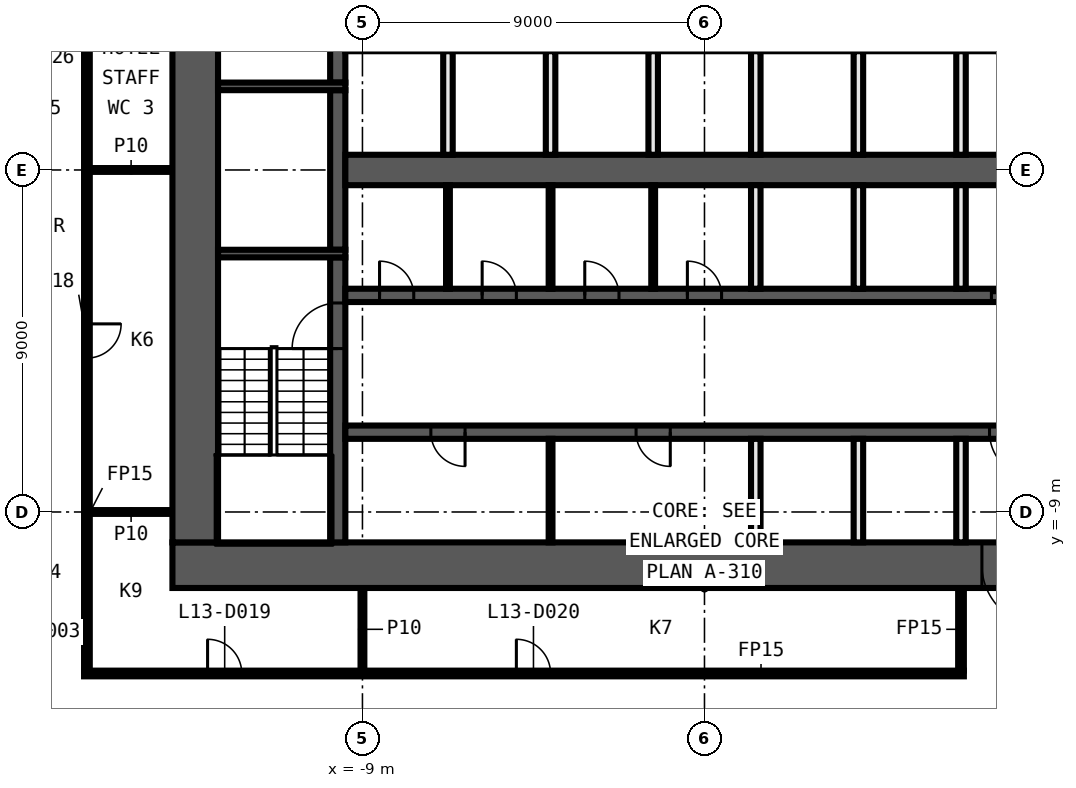
"""IFC4 building model, lengths in metres.
Left out: names, types, materials, properties, quantities, classifications, styles, units other than length and angle.
Written with IfcOpenShell. Run it as: python <this file> out.ifc"""

import sys

from ifc_helpers import new_model, si_unit, direction, frame, frame_2d, origin, place, context, subcontext, project, spatial, rectangle, extrude, element, fill, save


model = new_model("IFC4")
c1 = context("Model", 3, precision=1e-05, world=origin(), true_north=direction((0.0, 1.0)))
c2 = subcontext(c1, "Body", "Model", "MODEL_VIEW")
j1 = project(units=[si_unit("LENGTHUNIT", "METRE"), si_unit("PLANEANGLEUNIT", "RADIAN")], contexts=[c1])
p1 = place(None, origin())
s1 = spatial("IfcSite", under=j1, at=p1, CompositionType="ELEMENT")
p2 = place(p1, origin())
s2 = spatial("IfcBuilding", under=s1, at=p2, CompositionType="ELEMENT")
p3 = place(p2, frame((0.0, 0.0, 69.9)))
s3 = spatial("IfcBuildingStorey", under=s2, at=p3, CompositionType="ELEMENT", Elevation=69.9)
p4 = place(p3, frame((-16.325, -13.25, 0.0), z_axis=(0.0, 0.0, 1.0), x_axis=(1.0, 0.0, 0.0)))
e1 = element("IfcWall", 1, at=p4, inside=s3, PredefinedType="PARTITIONING", context=c2, shape_type="SweptSolid", body=[
    extrude(rectangle(XDim=23.15, YDim=0.15, at=frame_2d((11.575, 0.0))), origin(), (0.0, 0.0, 1.0), 3.3),
])
p5 = place(p4, frame((3.25, 0.0, 0.0)))
e2 = element("IfcOpeningElement", 2, at=p5, cuts=e1, PredefinedType="OPENING", context=c2, shape_type="SweptSolid", body=[
    extrude(rectangle(XDim=0.9, YDim=2.1, at=frame_2d((0.45, 1.05))), frame((0.0, 0.085, 0.0), z_axis=(0.0, -1.0, 0.0), x_axis=(1.0, 0.0, 0.0)), (0.0, 0.0, 1.0), 0.17),
])
p6 = place(p4, frame((11.375, 0.0, 0.0)))
e3 = element("IfcOpeningElement", 3, at=p6, cuts=e1, PredefinedType="OPENING", context=c2, shape_type="SweptSolid", body=[
    extrude(rectangle(XDim=0.9, YDim=2.1, at=frame_2d((0.45, 1.05))), frame((0.0, 0.085, 0.0), z_axis=(0.0, -1.0, 0.0), x_axis=(1.0, 0.0, 0.0)), (0.0, 0.0, 1.0), 0.17),
])
for number, where, z_axis, x_axis in (
    (4, (-16.175, -9.0, 0.0), (0.0, 0.0, 1.0), (1.0, 0.0, 0.0)),
    (5, (-16.175, 0.0, 0.0), (0.0, 0.0, 1.0), (1.0, 0.0, 0.0)),
):
    element("IfcWall", number, at=place(p3, frame(where, z_axis=z_axis, x_axis=x_axis)), inside=s3, PredefinedType="PARTITIONING", context=c2, shape_type="SweptSolid", body=[
        extrude(rectangle(XDim=2.175, YDim=0.1, at=frame_2d((1.087, 0.0))), origin(), (0.0, 0.0, 1.0), 3.3),
    ])
p7 = place(p3, frame((6.75, -13.175, 0.0), z_axis=(0.0, 0.0, 1.0), x_axis=(0.0, 1.0, 0.0)))
e6 = element("IfcWall", 6, at=p7, inside=s3, PredefinedType="PARTITIONING", context=c2, shape_type="SweptSolid", body=[
    extrude(rectangle(XDim=2.175, YDim=0.15, at=frame_2d((1.087, 0.0))), origin(), (0.0, 0.0, 1.0), 3.3),
])
p8 = place(p3, frame((-9.0, -13.175, 0.0), z_axis=(0.0, 0.0, 1.0), x_axis=(0.0, 1.0, 0.0)))
e7 = element("IfcWall", 7, at=p8, inside=s3, PredefinedType="PARTITIONING", context=c2, shape_type="SweptSolid", body=[
    extrude(rectangle(XDim=2.175, YDim=0.1, at=frame_2d((1.087, 0.0))), origin(), (0.0, 0.0, 1.0), 3.3),
])
p9 = place(p3, frame((-16.25, 13.175, 0.0), z_axis=(0.0, 0.0, 1.0), x_axis=(0.0, -1.0, 0.0)))
e8 = element("IfcWall", 8, at=p9, inside=s3, PredefinedType="PARTITIONING", context=c2, shape_type="SweptSolid", body=[
    extrude(rectangle(XDim=26.35, YDim=0.15, at=frame_2d((13.175, 0.0))), origin(), (0.0, 0.0, 1.0), 3.3),
])
p10 = place(p9, frame((17.225, 0.0, 0.0)))
e9 = element("IfcOpeningElement", 9, at=p10, cuts=e8, PredefinedType="OPENING", context=c2, shape_type="SweptSolid", body=[
    extrude(rectangle(XDim=0.9, YDim=2.1, at=frame_2d((0.45, 1.05))), frame((0.0, 0.085, 0.0), z_axis=(0.0, -1.0, 0.0), x_axis=(1.0, 0.0, 0.0)), (0.0, 0.0, 1.0), 0.17),
])
p11 = place(p9, frame((8.225, 0.0, 0.0)))
e10 = element("IfcOpeningElement", 10, at=p11, cuts=e8, PredefinedType="OPENING", context=c2, shape_type="SweptSolid", body=[
    extrude(rectangle(XDim=0.9, YDim=2.1, at=frame_2d((0.45, 1.05))), frame((0.0, 0.085, 0.0), z_axis=(0.0, -1.0, 0.0), x_axis=(1.0, 0.0, 0.0)), (0.0, 0.0, 1.0), 0.17),
])
p12 = place(p3, frame((14.0, -10.4, 0.0), z_axis=(0.0, 0.0, 1.0), x_axis=(-1.0, 0.0, 0.0)))
e11 = element("IfcWall", 11, at=p12, inside=s3, PredefinedType="SHEAR", context=c2, shape_type="SweptSolid", body=[
    extrude(rectangle(XDim=28.0, YDim=1.2, at=frame_2d((14.0, 0.0))), origin(), (0.0, 0.0, 1.0), 3.3),
])
p13 = place(p12, frame((5.1, 0.0, 0.0)))
e12 = element("IfcOpeningElement", 12, at=p13, cuts=e11, PredefinedType="OPENING", context=c2, shape_type="SweptSolid", body=[
    extrude(rectangle(XDim=1.6, YDim=2.1, at=frame_2d((0.8, 1.05))), frame((0.0, 0.61, 0.0), z_axis=(0.0, -1.0, 0.0), x_axis=(1.0, 0.0, 0.0)), (0.0, 0.0, 1.0), 1.22),
])
p14 = place(p3, frame((-13.4, -9.8, 0.0), z_axis=(0.0, 0.0, 1.0), x_axis=(0.0, 1.0, 0.0)))
e13 = element("IfcWall", 13, at=p14, inside=s3, PredefinedType="SHEAR", context=c2, shape_type="SweptSolid", body=[
    extrude(rectangle(XDim=19.6, YDim=1.2, at=frame_2d((9.8, 0.0))), origin(), (0.0, 0.0, 1.0), 3.3),
])
p15 = place(p3, frame((-9.65, -9.8, 0.0), z_axis=(0.0, 0.0, 1.0), x_axis=(0.0, 1.0, 0.0)))
e14 = element("IfcWall", 14, at=p15, inside=s3, PredefinedType="SHEAR", context=c2, shape_type="SweptSolid", body=[
    extrude(rectangle(XDim=7.5, YDim=0.4, at=frame_2d((3.75, 0.0))), origin(), (0.0, 0.0, 1.0), 3.3),
])
p16 = place(p15, frame((5.1, 0.0, 0.0)))
e15 = element("IfcOpeningElement", 15, at=p16, cuts=e14, PredefinedType="OPENING", context=c2, shape_type="SweptSolid", body=[
    extrude(rectangle(XDim=1.2, YDim=2.1, at=frame_2d((0.6, 1.05))), frame((0.0, 0.21, 0.0), z_axis=(0.0, -1.0, 0.0), x_axis=(1.0, 0.0, 0.0)), (0.0, 0.0, 1.0), 0.42),
])
p17 = place(p3, frame((-9.65, -2.1, 0.0), z_axis=(0.0, 0.0, 1.0), x_axis=(0.0, 1.0, 0.0)))
e16 = element("IfcWall", 16, at=p17, inside=s3, PredefinedType="SHEAR", context=c2, shape_type="SweptSolid", body=[
    extrude(rectangle(XDim=4.2, YDim=0.4, at=frame_2d((2.1, 0.0))), origin(), (0.0, 0.0, 1.0), 3.3),
])
p18 = place(p3, frame((-9.65, 2.3, 0.0), z_axis=(0.0, 0.0, 1.0), x_axis=(0.0, 1.0, 0.0)))
e17 = element("IfcWall", 17, at=p18, inside=s3, PredefinedType="SHEAR", context=c2, shape_type="SweptSolid", body=[
    extrude(rectangle(XDim=7.5, YDim=0.4, at=frame_2d((3.75, 0.0))), origin(), (0.0, 0.0, 1.0), 3.3),
])
p19 = place(p18, frame((1.2, 0.0, 0.0)))
e18 = element("IfcOpeningElement", 18, at=p19, cuts=e17, PredefinedType="OPENING", context=c2, shape_type="SweptSolid", body=[
    extrude(rectangle(XDim=1.2, YDim=2.1, at=frame_2d((0.6, 1.05))), frame((0.0, 0.21, 0.0), z_axis=(0.0, -1.0, 0.0), x_axis=(1.0, 0.0, 0.0)), (0.0, 0.0, 1.0), 0.42),
])
for number, where, z_axis, x_axis in (
    (19, (-9.45, 2.2, 0.0), (0.0, 0.0, 1.0), (-1.0, 0.0, 0.0)),
    (20, (-9.45, -2.2, 0.0), (0.0, 0.0, 1.0), (-1.0, 0.0, 0.0)),
):
    element("IfcWall", number, at=place(p3, frame(where, z_axis=z_axis, x_axis=x_axis)), inside=s3, PredefinedType="SHEAR", context=c2, shape_type="SweptSolid", body=[
        extrude(rectangle(XDim=3.35, YDim=0.2, at=frame_2d((1.675, 0.0))), origin(), (0.0, 0.0, 1.0), 3.3),
    ])
p20 = place(p3, frame((-9.45, -3.3, 0.0), z_axis=(0.0, 0.0, 1.0), x_axis=(1.0, 0.0, 0.0)))
e21 = element("IfcWall", 21, at=p20, inside=s3, PredefinedType="SHEAR", context=c2, shape_type="SweptSolid", body=[
    extrude(rectangle(XDim=18.9, YDim=0.35, at=frame_2d((9.45, 0.0))), origin(), (0.0, 0.0, 1.0), 3.3),
])
p21 = place(p20, frame((17.0, 0.0, 0.0)))
e22 = element("IfcOpeningElement", 22, at=p21, cuts=e21, PredefinedType="OPENING", context=c2, shape_type="SweptSolid", body=[
    extrude(rectangle(XDim=1.1, YDim=2.1, at=frame_2d((0.55, 1.05))), frame((0.0, 0.185, 0.0), z_axis=(0.0, -1.0, 0.0), x_axis=(1.0, 0.0, 0.0)), (0.0, 0.0, 1.0), 0.37),
])
p22 = place(p20, frame((0.9, 0.0, 0.0)))
e23 = element("IfcOpeningElement", 23, at=p22, cuts=e21, PredefinedType="OPENING", context=c2, shape_type="SweptSolid", body=[
    extrude(rectangle(XDim=0.9, YDim=2.1, at=frame_2d((0.45, 1.05))), frame((0.0, 0.185, 0.0), z_axis=(0.0, -1.0, 0.0), x_axis=(1.0, 0.0, 0.0)), (0.0, 0.0, 1.0), 0.37),
])
p23 = place(p20, frame((3.6, 0.0, 0.0)))
e24 = element("IfcOpeningElement", 24, at=p23, cuts=e21, PredefinedType="OPENING", context=c2, shape_type="SweptSolid", body=[
    extrude(rectangle(XDim=0.9, YDim=2.1, at=frame_2d((0.45, 1.05))), frame((0.0, 0.185, 0.0), z_axis=(0.0, -1.0, 0.0), x_axis=(1.0, 0.0, 0.0)), (0.0, 0.0, 1.0), 0.37),
])
p24 = place(p20, frame((6.3, 0.0, 0.0)))
e25 = element("IfcOpeningElement", 25, at=p24, cuts=e21, PredefinedType="OPENING", context=c2, shape_type="SweptSolid", body=[
    extrude(rectangle(XDim=0.9, YDim=2.1, at=frame_2d((0.45, 1.05))), frame((0.0, 0.185, 0.0), z_axis=(0.0, -1.0, 0.0), x_axis=(1.0, 0.0, 0.0)), (0.0, 0.0, 1.0), 0.37),
])
p25 = place(p20, frame((9.0, 0.0, 0.0)))
e26 = element("IfcOpeningElement", 26, at=p25, cuts=e21, PredefinedType="OPENING", context=c2, shape_type="SweptSolid", body=[
    extrude(rectangle(XDim=0.9, YDim=2.1, at=frame_2d((0.45, 1.05))), frame((0.0, 0.185, 0.0), z_axis=(0.0, -1.0, 0.0), x_axis=(1.0, 0.0, 0.0)), (0.0, 0.0, 1.0), 0.37),
])
p26 = place(p3, frame((9.45, -6.9, 0.0), z_axis=(0.0, 0.0, 1.0), x_axis=(-1.0, 0.0, 0.0)))
e27 = element("IfcWall", 27, at=p26, inside=s3, PredefinedType="SHEAR", context=c2, shape_type="SweptSolid", body=[
    extrude(rectangle(XDim=18.9, YDim=0.35, at=frame_2d((9.45, 0.0))), origin(), (0.0, 0.0, 1.0), 3.3),
])
p27 = place(p26, frame((0.75, 0.0, 0.0)))
e28 = element("IfcOpeningElement", 28, at=p27, cuts=e27, PredefinedType="OPENING", context=c2, shape_type="SweptSolid", body=[
    extrude(rectangle(XDim=1.2, YDim=2.1, at=frame_2d((0.6, 1.05))), frame((0.0, 0.185, 0.0), z_axis=(0.0, -1.0, 0.0), x_axis=(1.0, 0.0, 0.0)), (0.0, 0.0, 1.0), 0.37),
])
p28 = place(p26, frame((15.75, 0.0, 0.0)))
e29 = element("IfcOpeningElement", 29, at=p28, cuts=e27, PredefinedType="OPENING", context=c2, shape_type="SweptSolid", body=[
    extrude(rectangle(XDim=0.9, YDim=2.1, at=frame_2d((0.45, 1.05))), frame((0.0, 0.185, 0.0), z_axis=(0.0, -1.0, 0.0), x_axis=(1.0, 0.0, 0.0)), (0.0, 0.0, 1.0), 0.37),
])
p29 = place(p26, frame((10.35, 0.0, 0.0)))
e30 = element("IfcOpeningElement", 30, at=p29, cuts=e27, PredefinedType="OPENING", context=c2, shape_type="SweptSolid", body=[
    extrude(rectangle(XDim=0.9, YDim=2.1, at=frame_2d((0.45, 1.05))), frame((0.0, 0.185, 0.0), z_axis=(0.0, -1.0, 0.0), x_axis=(1.0, 0.0, 0.0)), (0.0, 0.0, 1.0), 0.37),
])
p30 = place(p3, frame((-9.45, 0.0, 0.0), z_axis=(0.0, 0.0, 1.0), x_axis=(1.0, 0.0, 0.0)))
e31 = element("IfcWall", 31, at=p30, inside=s3, PredefinedType="SHEAR", context=c2, shape_type="SweptSolid", body=[
    extrude(rectangle(XDim=18.9, YDim=0.8, at=frame_2d((9.45, 0.0))), origin(), (0.0, 0.0, 1.0), 3.3),
])
for number, where, z_axis, x_axis in (
    (32, (6.75, -9.8, 0.0), (0.0, 0.0, 1.0), (0.0, 1.0, 0.0)),
    (33, (6.75, -3.125, 0.0), (0.0, 0.0, 1.0), (0.0, 1.0, 0.0)),
    (34, (6.75, 0.4, 0.0), (0.0, 0.0, 1.0), (0.0, 1.0, 0.0)),
    (35, (4.05, -9.8, 0.0), (0.0, 0.0, 1.0), (0.0, 1.0, 0.0)),
    (36, (4.05, -3.125, 0.0), (0.0, 0.0, 1.0), (0.0, 1.0, 0.0)),
    (37, (4.05, 0.4, 0.0), (0.0, 0.0, 1.0), (0.0, 1.0, 0.0)),
    (38, (1.35, -9.8, 0.0), (0.0, 0.0, 1.0), (0.0, 1.0, 0.0)),
    (39, (1.35, -3.125, 0.0), (0.0, 0.0, 1.0), (0.0, 1.0, 0.0)),
    (40, (1.35, 0.4, 0.0), (0.0, 0.0, 1.0), (0.0, 1.0, 0.0)),
):
    element("IfcWall", number, at=place(p3, frame(where, z_axis=z_axis, x_axis=x_axis)), inside=s3, PredefinedType="SOLIDWALL", context=c2, shape_type="SweptSolid", body=[
        extrude(rectangle(XDim=2.725, YDim=0.25, at=frame_2d((1.363, 0.0))), origin(), (0.0, 0.0, 1.0), 3.3),
    ])
p31 = place(p3, frame((-1.35, -3.125, 0.0), z_axis=(0.0, 0.0, 1.0), x_axis=(0.0, 1.0, 0.0)))
e41 = element("IfcWall", 41, at=p31, inside=s3, PredefinedType="PARTITIONING", context=c2, shape_type="SweptSolid", body=[
    extrude(rectangle(XDim=2.725, YDim=0.1, at=frame_2d((1.363, 0.0))), origin(), (0.0, 0.0, 1.0), 3.3),
])
p32 = place(p3, frame((-1.35, 0.4, 0.0), z_axis=(0.0, 0.0, 1.0), x_axis=(0.0, 1.0, 0.0)))
e42 = element("IfcWall", 42, at=p32, inside=s3, PredefinedType="SOLIDWALL", context=c2, shape_type="SweptSolid", body=[
    extrude(rectangle(XDim=2.725, YDim=0.25, at=frame_2d((1.363, 0.0))), origin(), (0.0, 0.0, 1.0), 3.3),
])
for number, where, z_axis, x_axis in (
    (43, (-4.05, -9.8, 0.0), (0.0, 0.0, 1.0), (0.0, 1.0, 0.0)),
    (44, (-4.05, -3.125, 0.0), (0.0, 0.0, 1.0), (0.0, 1.0, 0.0)),
):
    element("IfcWall", number, at=place(p3, frame(where, z_axis=z_axis, x_axis=x_axis)), inside=s3, PredefinedType="PARTITIONING", context=c2, shape_type="SweptSolid", body=[
        extrude(rectangle(XDim=2.725, YDim=0.1, at=frame_2d((1.363, 0.0))), origin(), (0.0, 0.0, 1.0), 3.3),
    ])
p33 = place(p3, frame((-4.05, 0.4, 0.0), z_axis=(0.0, 0.0, 1.0), x_axis=(0.0, 1.0, 0.0)))
e45 = element("IfcWall", 45, at=p33, inside=s3, PredefinedType="SOLIDWALL", context=c2, shape_type="SweptSolid", body=[
    extrude(rectangle(XDim=2.725, YDim=0.25, at=frame_2d((1.363, 0.0))), origin(), (0.0, 0.0, 1.0), 3.3),
])
p34 = place(p3, frame((-6.75, -3.125, 0.0), z_axis=(0.0, 0.0, 1.0), x_axis=(0.0, 1.0, 0.0)))
e46 = element("IfcWall", 46, at=p34, inside=s3, PredefinedType="PARTITIONING", context=c2, shape_type="SweptSolid", body=[
    extrude(rectangle(XDim=2.725, YDim=0.1, at=frame_2d((1.363, 0.0))), origin(), (0.0, 0.0, 1.0), 3.3),
])
p35 = place(p3, frame((-6.75, 0.4, 0.0), z_axis=(0.0, 0.0, 1.0), x_axis=(0.0, 1.0, 0.0)))
e47 = element("IfcWall", 47, at=p35, inside=s3, PredefinedType="SOLIDWALL", context=c2, shape_type="SweptSolid", body=[
    extrude(rectangle(XDim=2.725, YDim=0.25, at=frame_2d((1.363, 0.0))), origin(), (0.0, 0.0, 1.0), 3.3),
])
p36 = place(p10, origin())
e48 = element("IfcDoor", 48, at=p36, inside=s3, OperationType="SINGLE_SWING_RIGHT", PredefinedType="DOOR", context=c2, shape_type="SweptSolid", body=[
    extrude(rectangle(XDim=0.9, YDim=2.1, at=frame_2d((0.45, 1.05))), frame((0.0, 0.025, 0.0), z_axis=(0.0, -1.0, 0.0), x_axis=(1.0, 0.0, 0.0)), (0.0, 0.0, 1.0), 0.05),
])
fill(e9, e48)
p37 = place(p5, origin())
e49 = element("IfcDoor", 49, at=p37, inside=s3, OperationType="SINGLE_SWING_LEFT", PredefinedType="DOOR", context=c2, shape_type="SweptSolid", body=[
    extrude(rectangle(XDim=0.9, YDim=2.1, at=frame_2d((0.45, 1.05))), frame((0.0, 0.025, 0.0), z_axis=(0.0, -1.0, 0.0), x_axis=(1.0, 0.0, 0.0)), (0.0, 0.0, 1.0), 0.05),
])
fill(e2, e49)
p38 = place(p6, origin())
e50 = element("IfcDoor", 50, at=p38, inside=s3, OperationType="SINGLE_SWING_RIGHT", PredefinedType="DOOR", context=c2, shape_type="SweptSolid", body=[
    extrude(rectangle(XDim=0.9, YDim=2.1, at=frame_2d((0.45, 1.05))), frame((0.0, 0.025, 0.0), z_axis=(0.0, -1.0, 0.0), x_axis=(1.0, 0.0, 0.0)), (0.0, 0.0, 1.0), 0.05),
])
fill(e3, e50)
p39 = place(p21, origin())
e51 = element("IfcDoor", 51, at=p39, inside=s3, OperationType="DOUBLE_DOOR_SLIDING", PredefinedType="DOOR", context=c2, shape_type="SweptSolid", body=[
    extrude(rectangle(XDim=1.1, YDim=2.1, at=frame_2d((0.55, 1.05))), frame((0.0, 0.025, 0.0), z_axis=(0.0, -1.0, 0.0), x_axis=(1.0, 0.0, 0.0)), (0.0, 0.0, 1.0), 0.05),
])
fill(e22, e51)
p40 = place(p13, origin())
e52 = element("IfcDoor", 52, at=p40, inside=s3, OperationType="DOUBLE_DOOR_SINGLE_SWING", PredefinedType="DOOR", context=c2, shape_type="SweptSolid", body=[
    extrude(rectangle(XDim=1.6, YDim=2.1, at=frame_2d((0.8, 1.05))), frame((0.0, 0.025, 0.0), z_axis=(0.0, -1.0, 0.0), x_axis=(1.0, 0.0, 0.0)), (0.0, 0.0, 1.0), 0.05),
])
fill(e12, e52)
p41 = place(p27, origin())
e53 = element("IfcDoor", 53, at=p41, inside=s3, OperationType="SINGLE_SWING_LEFT", PredefinedType="DOOR", context=c2, shape_type="SweptSolid", body=[
    extrude(rectangle(XDim=1.2, YDim=2.1, at=frame_2d((0.6, 1.05))), frame((0.0, 0.025, 0.0), z_axis=(0.0, -1.0, 0.0), x_axis=(1.0, 0.0, 0.0)), (0.0, 0.0, 1.0), 0.05),
])
fill(e28, e53)
p42 = place(p22, origin())
e54 = element("IfcDoor", 54, at=p42, inside=s3, OperationType="SINGLE_SWING_RIGHT", PredefinedType="DOOR", context=c2, shape_type="SweptSolid", body=[
    extrude(rectangle(XDim=0.9, YDim=2.1, at=frame_2d((0.45, 1.05))), frame((0.0, 0.025, 0.0), z_axis=(0.0, -1.0, 0.0), x_axis=(1.0, 0.0, 0.0)), (0.0, 0.0, 1.0), 0.05),
])
fill(e23, e54)
p43 = place(p23, origin())
e55 = element("IfcDoor", 55, at=p43, inside=s3, OperationType="SINGLE_SWING_LEFT", PredefinedType="DOOR", context=c2, shape_type="SweptSolid", body=[
    extrude(rectangle(XDim=0.9, YDim=2.1, at=frame_2d((0.45, 1.05))), frame((0.0, 0.025, 0.0), z_axis=(0.0, -1.0, 0.0), x_axis=(1.0, 0.0, 0.0)), (0.0, 0.0, 1.0), 0.05),
])
fill(e24, e55)
p44 = place(p24, origin())
e56 = element("IfcDoor", 56, at=p44, inside=s3, OperationType="SINGLE_SWING_RIGHT", PredefinedType="DOOR", context=c2, shape_type="SweptSolid", body=[
    extrude(rectangle(XDim=0.9, YDim=2.1, at=frame_2d((0.45, 1.05))), frame((0.0, 0.025, 0.0), z_axis=(0.0, -1.0, 0.0), x_axis=(1.0, 0.0, 0.0)), (0.0, 0.0, 1.0), 0.05),
])
fill(e25, e56)
p45 = place(p25, origin())
e57 = element("IfcDoor", 57, at=p45, inside=s3, OperationType="SINGLE_SWING_LEFT", PredefinedType="DOOR", context=c2, shape_type="SweptSolid", body=[
    extrude(rectangle(XDim=0.9, YDim=2.1, at=frame_2d((0.45, 1.05))), frame((0.0, 0.025, 0.0), z_axis=(0.0, -1.0, 0.0), x_axis=(1.0, 0.0, 0.0)), (0.0, 0.0, 1.0), 0.05),
])
fill(e26, e57)
p46 = place(p28, origin())
e58 = element("IfcDoor", 58, at=p46, inside=s3, OperationType="SINGLE_SWING_RIGHT", PredefinedType="DOOR", context=c2, shape_type="SweptSolid", body=[
    extrude(rectangle(XDim=0.9, YDim=2.1, at=frame_2d((0.45, 1.05))), frame((0.0, 0.025, 0.0), z_axis=(0.0, -1.0, 0.0), x_axis=(1.0, 0.0, 0.0)), (0.0, 0.0, 1.0), 0.05),
])
fill(e29, e58)
p47 = place(p29, origin())
e59 = element("IfcDoor", 59, at=p47, inside=s3, OperationType="SINGLE_SWING_LEFT", PredefinedType="DOOR", context=c2, shape_type="SweptSolid", body=[
    extrude(rectangle(XDim=0.9, YDim=2.1, at=frame_2d((0.45, 1.05))), frame((0.0, 0.025, 0.0), z_axis=(0.0, -1.0, 0.0), x_axis=(1.0, 0.0, 0.0)), (0.0, 0.0, 1.0), 0.05),
])
fill(e30, e59)
p48 = place(p16, origin())
e60 = element("IfcDoor", 60, at=p48, inside=s3, OperationType="SINGLE_SWING_LEFT", PredefinedType="DOOR", context=c2, shape_type="SweptSolid", body=[
    extrude(rectangle(XDim=1.2, YDim=2.1, at=frame_2d((0.6, 1.05))), frame((0.0, 0.025, 0.0), z_axis=(0.0, -1.0, 0.0), x_axis=(1.0, 0.0, 0.0)), (0.0, 0.0, 1.0), 0.05),
])
fill(e15, e60)
save(model, sys.argv[1])
